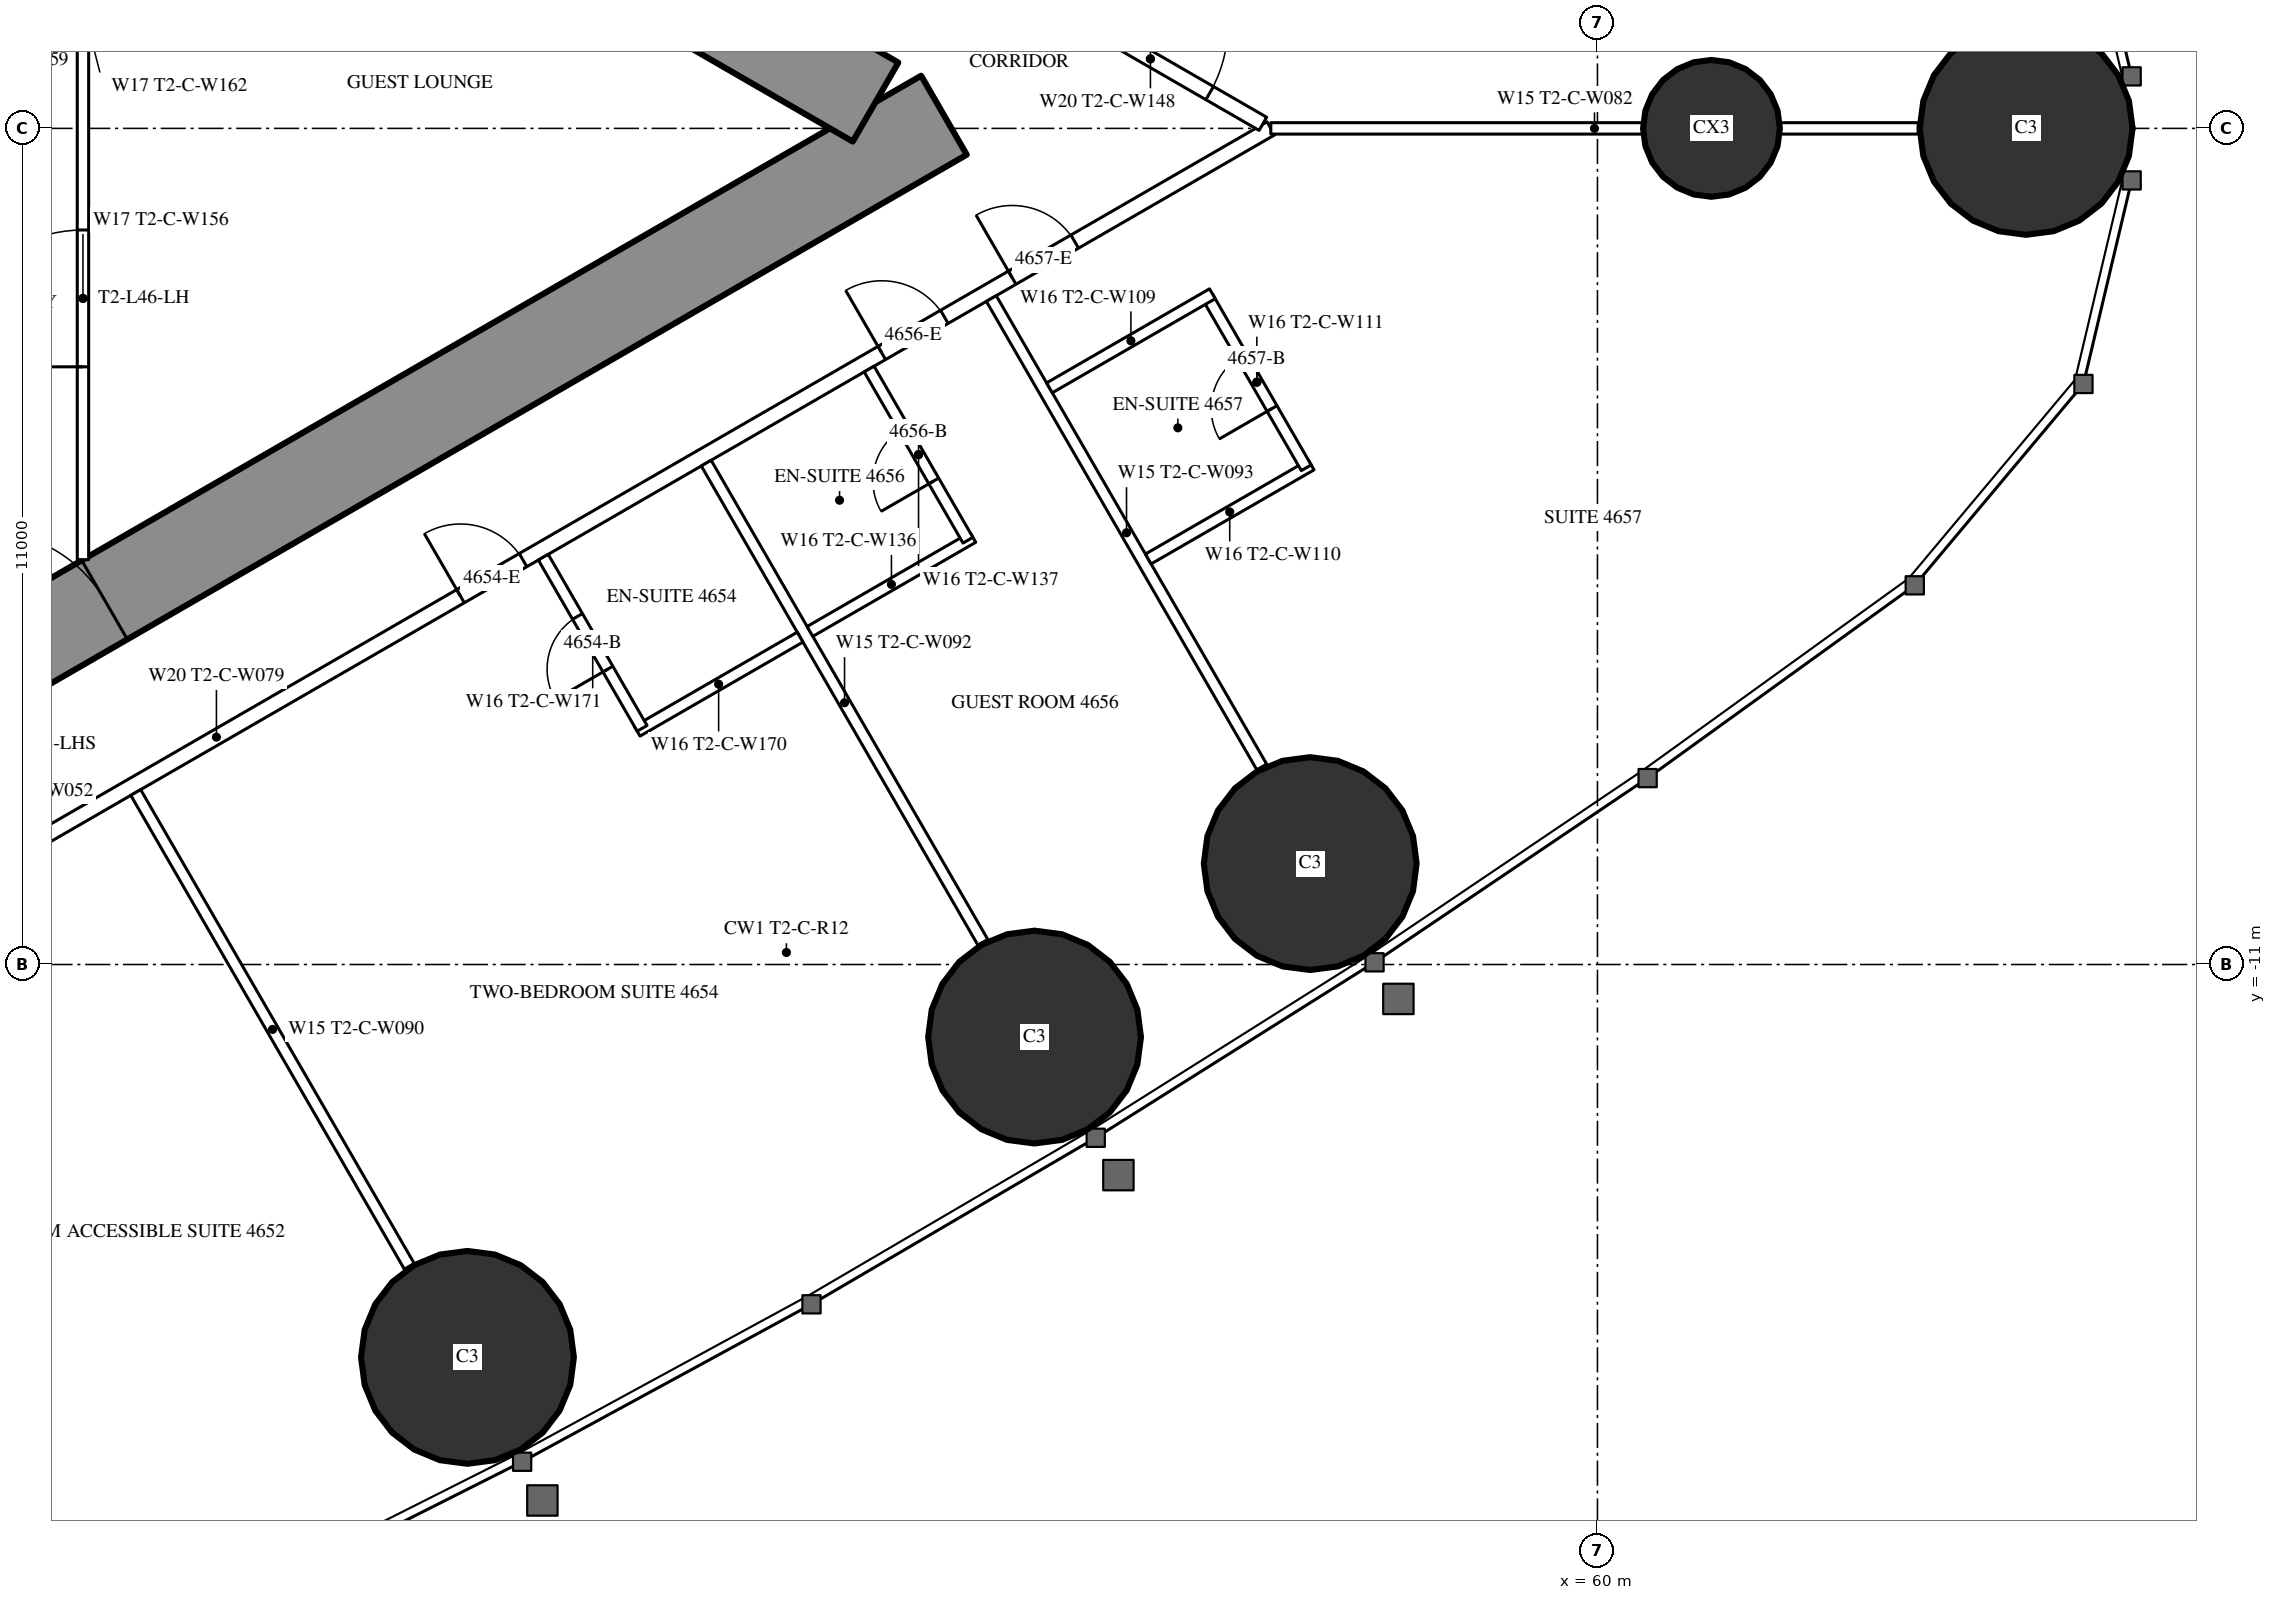
"""IFC4 building model, lengths in metres.
Left out: names, types, materials, properties, quantities, classifications, styles, units other than length and angle.
Written with IfcOpenShell. Run it as: python <this file> out.ifc"""

import sys

from ifc_helpers import new_model, si_unit, direction, frame, frame_2d, origin, origin_2d, place, context, subcontext, project, spatial, rectangle, circle, extrude, element, fill, save


model = new_model("IFC4")
c1 = context("Model", 3, precision=1e-05, world=origin(), true_north=direction((0.0, 1.0)))
c2 = subcontext(c1, "Body", "Model", "MODEL_VIEW")
j1 = project(units=[si_unit("LENGTHUNIT", "METRE"), si_unit("PLANEANGLEUNIT", "RADIAN")], contexts=[c1])
p1 = place(None, origin())
s1 = spatial("IfcSite", under=j1, at=p1, CompositionType="ELEMENT")
p2 = place(p1, origin())
s2 = spatial("IfcBuilding", under=s1, at=p2, CompositionType="ELEMENT")
p3 = place(p2, frame((0.0, 0.0, 173.8)))
s3 = spatial("IfcBuildingStorey", under=s2, at=p3, CompositionType="ELEMENT", Elevation=173.8)
for number, where, z_axis, x_axis in (
    (1, (65.64, 0.0, 0.0), (0.0, 0.0, 1.0), (1.0, 0.0, 0.0)),
    (2, (45.134, -16.168, 0.0), (0.0, 0.0, 1.0), (1.0, 0.0, 0.0)),
    (3, (52.594, -11.955, 0.0), (0.0, 0.0, 1.0), (1.0, 0.0, 0.0)),
    (4, (56.221, -9.672, 0.0), (0.0, 0.0, 1.0), (1.0, 0.0, 0.0)),
):
    element("IfcColumn", number, at=place(p3, frame(where, z_axis=z_axis, x_axis=x_axis)), inside=s3, PredefinedType="COLUMN", context=c2, shape_type="SweptSolid", body=[
        extrude(circle(Radius=1.4, at=origin_2d()), origin(), (0.0, 0.0, 1.0), 3.5),
    ])
p4 = place(p3, frame((61.5, 0.0, 0.0), z_axis=(0.0, 0.0, 1.0), x_axis=(1.0, 0.0, 0.0)))
e5 = element("IfcColumn", 5, at=p4, inside=s3, PredefinedType="COLUMN", context=c2, shape_type="SweptSolid", body=[
    extrude(circle(Radius=0.9, at=origin_2d()), origin(), (0.0, 0.0, 1.0), 3.5),
])
p5 = place(p3, frame((27.2, -13.8, 0.0), z_axis=(0.0, 0.0, 1.0), x_axis=(0.866027159892, 0.499996958321, 0.0)))
e6 = element("IfcWall", 6, at=p5, inside=s3, PredefinedType="SHEAR", context=c2, shape_type="SweptSolid", body=[
    extrude(rectangle(XDim=27.947, YDim=1.2, at=frame_2d((13.973, 0.0))), origin(), (0.0, 0.0, 1.0), 3.5),
])
p6 = place(p5, frame((4.6, 0.0, 0.0)))
e7 = element("IfcOpeningElement", 7, at=p6, cuts=e6, PredefinedType="OPENING", context=c2, shape_type="SweptSolid", body=[
    extrude(rectangle(XDim=1.0, YDim=2.2, at=frame_2d((0.5, 1.1))), frame((0.0, 0.61, 0.0), z_axis=(0.0, -1.0, 0.0), x_axis=(1.0, 0.0, 0.0)), (0.0, 0.0, 1.0), 1.22),
])
p7 = place(p5, frame((13.395, 0.0, 0.0)))
e8 = element("IfcOpeningElement", 8, at=p7, cuts=e6, PredefinedType="OPENING", context=c2, shape_type="SweptSolid", body=[
    extrude(rectangle(XDim=1.8, YDim=2.2, at=frame_2d((0.9, 1.1))), frame((0.0, 0.61, 0.0), z_axis=(0.0, -1.0, 0.0), x_axis=(1.0, 0.0, 0.0)), (0.0, 0.0, 1.0), 1.22),
])
p8 = place(p3, frame((27.2, 13.8, 0.0), z_axis=(0.0, 0.0, 1.0), x_axis=(0.866024515034, -0.500001539357, 0.0)))
e9 = element("IfcWall", 9, at=p8, inside=s3, PredefinedType="SHEAR", context=c2, shape_type="SweptSolid", body=[
    extrude(rectangle(XDim=26.907, YDim=1.2, at=frame_2d((13.454, 0.0))), origin(), (0.0, 0.0, 1.0), 3.5),
])
p9 = place(p8, frame((4.6, 0.0, 0.0)))
e10 = element("IfcOpeningElement", 10, at=p9, cuts=e9, PredefinedType="OPENING", context=c2, shape_type="SweptSolid", body=[
    extrude(rectangle(XDim=1.0, YDim=2.2, at=frame_2d((0.5, 1.1))), frame((0.0, 0.61, 0.0), z_axis=(0.0, -1.0, 0.0), x_axis=(1.0, 0.0, 0.0)), (0.0, 0.0, 1.0), 1.22),
])
p10 = place(p8, frame((13.395, 0.0, 0.0)))
e11 = element("IfcOpeningElement", 11, at=p10, cuts=e9, PredefinedType="OPENING", context=c2, shape_type="SweptSolid", body=[
    extrude(rectangle(XDim=1.8, YDim=2.2, at=frame_2d((0.9, 1.1))), frame((0.0, 0.61, 0.0), z_axis=(0.0, -1.0, 0.0), x_axis=(1.0, 0.0, 0.0)), (0.0, 0.0, 1.0), 1.22),
])
p11 = place(p3, frame((27.959, -16.017, 0.0), z_axis=(0.0, 0.0, 1.0), x_axis=(0.866024151371, 0.500002169237, 0.0)))
e12 = element("IfcWall", 12, at=p11, inside=s3, PredefinedType="PARTITIONING", context=c2, shape_type="SweptSolid", body=[
    extrude(rectangle(XDim=32.034, YDim=0.2, at=frame_2d((16.017, 0.0))), origin(), (0.0, 0.0, 1.0), 3.25),
])
p12 = place(p11, frame((4.765, 0.0, 0.0)))
e13 = element("IfcOpeningElement", 13, at=p12, cuts=e12, PredefinedType="OPENING", context=c2, shape_type="SweptSolid", body=[
    extrude(rectangle(XDim=0.95, YDim=2.2, at=frame_2d((0.475, 1.1))), frame((0.0, 0.11, 0.0), z_axis=(0.0, -1.0, 0.0), x_axis=(1.0, 0.0, 0.0)), (0.0, 0.0, 1.0), 0.22),
])
p13 = place(p11, frame((9.215, 0.0, 0.0)))
e14 = element("IfcOpeningElement", 14, at=p13, cuts=e12, PredefinedType="OPENING", context=c2, shape_type="SweptSolid", body=[
    extrude(rectangle(XDim=1.0, YDim=2.2, at=frame_2d((0.5, 1.1))), frame((0.0, 0.11, 0.0), z_axis=(0.0, -1.0, 0.0), x_axis=(1.0, 0.0, 0.0)), (0.0, 0.0, 1.0), 0.22),
])
p14 = place(p11, frame((19.725, 0.0, 0.0)))
e15 = element("IfcOpeningElement", 15, at=p14, cuts=e12, PredefinedType="OPENING", context=c2, shape_type="SweptSolid", body=[
    extrude(rectangle(XDim=0.95, YDim=2.2, at=frame_2d((0.475, 1.1))), frame((0.0, 0.11, 0.0), z_axis=(0.0, -1.0, 0.0), x_axis=(1.0, 0.0, 0.0)), (0.0, 0.0, 1.0), 0.22),
])
p15 = place(p11, frame((26.125, 0.0, 0.0)))
e16 = element("IfcOpeningElement", 16, at=p15, cuts=e12, PredefinedType="OPENING", context=c2, shape_type="SweptSolid", body=[
    extrude(rectangle(XDim=0.95, YDim=2.2, at=frame_2d((0.475, 1.1))), frame((0.0, 0.11, 0.0), z_axis=(0.0, -1.0, 0.0), x_axis=(1.0, 0.0, 0.0)), (0.0, 0.0, 1.0), 0.22),
])
p16 = place(p11, frame((28.106, 0.0, 0.0)))
e17 = element("IfcOpeningElement", 17, at=p16, cuts=e12, PredefinedType="OPENING", context=c2, shape_type="SweptSolid", body=[
    extrude(rectangle(XDim=0.95, YDim=2.2, at=frame_2d((0.475, 1.1))), frame((0.0, 0.11, 0.0), z_axis=(0.0, -1.0, 0.0), x_axis=(1.0, 0.0, 0.0)), (0.0, 0.0, 1.0), 0.22),
])
p17 = place(p3, frame((40.769, -8.737, 0.0), z_axis=(0.0, 0.0, 1.0), x_axis=(0.500013115284, -0.866017831539, 0.0)))
e18 = element("IfcWall", 18, at=p17, inside=s3, PredefinedType="PARTITIONING", context=c2, shape_type="SweptSolid", body=[
    extrude(rectangle(XDim=7.198, YDim=0.15, at=frame_2d((3.599, 0.0))), origin(), (0.0, 0.0, 1.0), 2.3),
])
p18 = place(p3, frame((48.275, -4.404, 0.0), z_axis=(0.0, 0.0, 1.0), x_axis=(0.500006004368, -0.866021937133, 0.0)))
e19 = element("IfcWall", 19, at=p18, inside=s3, PredefinedType="PARTITIONING", context=c2, shape_type="SweptSolid", body=[
    extrude(rectangle(XDim=7.279, YDim=0.15, at=frame_2d((3.64, 0.0))), origin(), (0.0, 0.0, 1.0), 2.3),
])
p19 = place(p3, frame((52.025, -2.238, 0.0), z_axis=(0.0, 0.0, 1.0), x_axis=(0.499983785035, -0.866034765296, 0.0)))
e20 = element("IfcWall", 20, at=p19, inside=s3, PredefinedType="PARTITIONING", context=c2, shape_type="SweptSolid", body=[
    extrude(rectangle(XDim=7.116, YDim=0.15, at=frame_2d((3.558, 0.0))), origin(), (0.0, 0.0, 1.0), 2.3),
])
p20 = place(p3, frame((55.702, 0.0, 0.0), z_axis=(0.0, 0.0, 1.0), x_axis=(1.0, 0.0, 0.0)))
e21 = element("IfcWall", 21, at=p20, inside=s3, PredefinedType="PARTITIONING", context=c2, shape_type="SweptSolid", body=[
    extrude(rectangle(XDim=8.518, YDim=0.15, at=frame_2d((4.259, 0.0))), origin(), (0.0, 0.0, 1.0), 2.3),
])
p21 = place(p3, frame((52.639, 1.769, 0.0), z_axis=(0.0, 0.0, 1.0), x_axis=(0.866027340901, -0.4999966448, 0.0)))
e22 = element("IfcWall", 22, at=p21, inside=s3, PredefinedType="PARTITIONING", context=c2, shape_type="SweptSolid", body=[
    extrude(rectangle(XDim=3.417, YDim=0.2, at=frame_2d((1.708, 0.0))), origin(), (0.0, 0.0, 1.0), 3.25),
])
p22 = place(p21, frame((0.809, 0.0, 0.0)))
e23 = element("IfcOpeningElement", 23, at=p22, cuts=e22, PredefinedType="OPENING", context=c2, shape_type="SweptSolid", body=[
    extrude(rectangle(XDim=1.8, YDim=2.2, at=frame_2d((0.9, 1.1))), frame((0.0, 0.11, 0.0), z_axis=(0.0, -1.0, 0.0), x_axis=(1.0, 0.0, 0.0)), (0.0, 0.0, 1.0), 0.22),
])
p23 = place(p3, frame((47.366, -7.93, 0.0), z_axis=(0.0, 0.0, 1.0), x_axis=(0.866031185235, 0.4999899861, 0.0)))
e24 = element("IfcWall", 24, at=p23, inside=s3, PredefinedType="PARTITIONING", context=c2, shape_type="SweptSolid", body=[
    extrude(rectangle(XDim=2.475, YDim=0.15, at=frame_2d((1.238, 0.0))), origin(), (0.0, 0.0, 1.0), 3.25),
])
p24 = place(p3, frame((46.131, -5.641, 0.0), z_axis=(0.0, 0.0, 1.0), x_axis=(0.49997716683, -0.86603858612, 0.0)))
e25 = element("IfcWall", 25, at=p24, inside=s3, PredefinedType="PARTITIONING", context=c2, shape_type="SweptSolid", body=[
    extrude(rectangle(XDim=2.6, YDim=0.15, at=frame_2d((1.3, 0.0))), origin(), (0.0, 0.0, 1.0), 3.25),
])
p25 = place(p24, frame((0.9, 0.0, 0.0)))
e26 = element("IfcOpeningElement", 26, at=p25, cuts=e25, PredefinedType="OPENING", context=c2, shape_type="SweptSolid", body=[
    extrude(rectangle(XDim=0.8, YDim=2.2, at=frame_2d((0.4, 1.1))), frame((0.0, 0.085, 0.0), z_axis=(0.0, -1.0, 0.0), x_axis=(1.0, 0.0, 0.0)), (0.0, 0.0, 1.0), 0.17),
])
p26 = place(p3, frame((49.64, -6.618, 0.0), z_axis=(0.0, 0.0, 1.0), x_axis=(0.866006523861, 0.500032699561, 0.0)))
e27 = element("IfcWall", 27, at=p26, inside=s3, PredefinedType="PARTITIONING", context=c2, shape_type="SweptSolid", body=[
    extrude(rectangle(XDim=2.475, YDim=0.15, at=frame_2d((1.237, 0.0))), origin(), (0.0, 0.0, 1.0), 3.25),
])
p27 = place(p3, frame((50.418, -3.166, 0.0), z_axis=(0.0, 0.0, 1.0), x_axis=(0.499936506574, -0.866062058628, 0.0)))
e28 = element("IfcWall", 28, at=p27, inside=s3, PredefinedType="PARTITIONING", context=c2, shape_type="SweptSolid", body=[
    extrude(rectangle(XDim=2.6, YDim=0.15, at=frame_2d((1.3, 0.0))), origin(), (0.0, 0.0, 1.0), 3.25),
])
p28 = place(p27, frame((0.9, 0.0, 0.0)))
e29 = element("IfcOpeningElement", 29, at=p28, cuts=e28, PredefinedType="OPENING", context=c2, shape_type="SweptSolid", body=[
    extrude(rectangle(XDim=0.8, YDim=2.2, at=frame_2d((0.4, 1.1))), frame((0.0, 0.085, 0.0), z_axis=(0.0, -1.0, 0.0), x_axis=(1.0, 0.0, 0.0)), (0.0, 0.0, 1.0), 0.17),
])
p29 = place(p3, frame((54.09, -5.665, 0.0), z_axis=(0.0, 0.0, 1.0), x_axis=(0.866006523861, 0.500032699561, 0.0)))
e30 = element("IfcWall", 30, at=p29, inside=s3, PredefinedType="PARTITIONING", context=c2, shape_type="SweptSolid", body=[
    extrude(rectangle(XDim=2.475, YDim=0.15, at=frame_2d((1.237, 0.0))), origin(), (0.0, 0.0, 1.0), 3.25),
])
p30 = place(p3, frame((54.869, -2.213, 0.0), z_axis=(0.0, 0.0, 1.0), x_axis=(0.500047596559, -0.865997922154, 0.0)))
e31 = element("IfcWall", 31, at=p30, inside=s3, PredefinedType="PARTITIONING", context=c2, shape_type="SweptSolid", body=[
    extrude(rectangle(XDim=2.6, YDim=0.15, at=frame_2d((1.3, 0.0))), origin(), (0.0, 0.0, 1.0), 3.25),
])
p31 = place(p30, frame((0.9, 0.0, 0.0)))
e32 = element("IfcOpeningElement", 32, at=p31, cuts=e31, PredefinedType="OPENING", context=c2, shape_type="SweptSolid", body=[
    extrude(rectangle(XDim=0.8, YDim=2.2, at=frame_2d((0.4, 1.1))), frame((0.0, 0.085, 0.0), z_axis=(0.0, -1.0, 0.0), x_axis=(1.0, 0.0, 0.0)), (0.0, 0.0, 1.0), 0.17),
])
p32 = place(p3, frame((52.79, -3.413, 0.0), z_axis=(0.0, 0.0, 1.0), x_axis=(0.866006523861, 0.500032699561, 0.0)))
e33 = element("IfcWall", 33, at=p32, inside=s3, PredefinedType="PARTITIONING", context=c2, shape_type="SweptSolid", body=[
    extrude(rectangle(XDim=2.475, YDim=0.15, at=frame_2d((1.237, 0.0))), origin(), (0.0, 0.0, 1.0), 3.25),
])
p33 = place(p3, frame((40.075, -5.674, 0.0), z_axis=(0.0, 0.0, 1.0), x_axis=(0.0, 1.0, 0.0)))
e34 = element("IfcWall", 34, at=p33, inside=s3, PredefinedType="PARTITIONING", context=c2, shape_type="SweptSolid", body=[
    extrude(rectangle(XDim=6.874, YDim=0.15, at=frame_2d((3.437, 0.0))), origin(), (0.0, 0.0, 1.0), 3.25),
])
p34 = place(p33, frame((2.537, 0.0, 0.0)))
e35 = element("IfcOpeningElement", 35, at=p34, cuts=e34, PredefinedType="OPENING", context=c2, shape_type="SweptSolid", body=[
    extrude(rectangle(XDim=1.8, YDim=2.2, at=frame_2d((0.9, 1.1))), frame((0.0, 0.085, 0.0), z_axis=(0.0, -1.0, 0.0), x_axis=(1.0, 0.0, 0.0)), (0.0, 0.0, 1.0), 0.17),
])
p35 = place(p25, origin())
e36 = element("IfcDoor", 36, at=p35, inside=s3, OperationType="SINGLE_SWING_RIGHT", PredefinedType="DOOR", context=c2, shape_type="SweptSolid", body=[
    extrude(rectangle(XDim=0.8, YDim=2.2, at=frame_2d((0.4, 1.1))), frame((0.0, 0.025, 0.0), z_axis=(0.0, -1.0, 0.0), x_axis=(1.0, 0.0, 0.0)), (0.0, 0.0, 1.0), 0.05),
])
fill(e26, e36)
p36 = place(p14, origin())
e37 = element("IfcDoor", 37, at=p36, inside=s3, OperationType="SINGLE_SWING_LEFT", PredefinedType="DOOR", context=c2, shape_type="SweptSolid", body=[
    extrude(rectangle(XDim=0.95, YDim=2.2, at=frame_2d((0.475, 1.1))), frame((0.0, 0.025, 0.0), z_axis=(0.0, -1.0, 0.0), x_axis=(1.0, 0.0, 0.0)), (0.0, 0.0, 1.0), 0.05),
])
fill(e15, e37)
p37 = place(p28, origin())
e38 = element("IfcDoor", 38, at=p37, inside=s3, OperationType="SINGLE_SWING_RIGHT", PredefinedType="DOOR", context=c2, shape_type="SweptSolid", body=[
    extrude(rectangle(XDim=0.8, YDim=2.2, at=frame_2d((0.4, 1.1))), frame((0.0, 0.025, 0.0), z_axis=(0.0, -1.0, 0.0), x_axis=(1.0, 0.0, 0.0)), (0.0, 0.0, 1.0), 0.05),
])
fill(e29, e38)
p38 = place(p15, origin())
e39 = element("IfcDoor", 39, at=p38, inside=s3, OperationType="SINGLE_SWING_LEFT", PredefinedType="DOOR", context=c2, shape_type="SweptSolid", body=[
    extrude(rectangle(XDim=0.95, YDim=2.2, at=frame_2d((0.475, 1.1))), frame((0.0, 0.025, 0.0), z_axis=(0.0, -1.0, 0.0), x_axis=(1.0, 0.0, 0.0)), (0.0, 0.0, 1.0), 0.05),
])
fill(e16, e39)
p39 = place(p31, origin())
e40 = element("IfcDoor", 40, at=p39, inside=s3, OperationType="SINGLE_SWING_RIGHT", PredefinedType="DOOR", context=c2, shape_type="SweptSolid", body=[
    extrude(rectangle(XDim=0.8, YDim=2.2, at=frame_2d((0.4, 1.1))), frame((0.0, 0.025, 0.0), z_axis=(0.0, -1.0, 0.0), x_axis=(1.0, 0.0, 0.0)), (0.0, 0.0, 1.0), 0.05),
])
fill(e32, e40)
p40 = place(p16, origin())
e41 = element("IfcDoor", 41, at=p40, inside=s3, OperationType="SINGLE_SWING_LEFT", PredefinedType="DOOR", context=c2, shape_type="SweptSolid", body=[
    extrude(rectangle(XDim=0.95, YDim=2.2, at=frame_2d((0.475, 1.1))), frame((0.0, 0.025, 0.0), z_axis=(0.0, -1.0, 0.0), x_axis=(1.0, 0.0, 0.0)), (0.0, 0.0, 1.0), 0.05),
])
fill(e17, e41)
p41 = place(p22, origin())
e42 = element("IfcDoor", 42, at=p41, inside=s3, OperationType="DOUBLE_DOOR_SINGLE_SWING", PredefinedType="DOOR", context=c2, shape_type="SweptSolid", body=[
    extrude(rectangle(XDim=1.8, YDim=2.2, at=frame_2d((0.9, 1.1))), frame((0.0, 0.025, 0.0), z_axis=(0.0, -1.0, 0.0), x_axis=(1.0, 0.0, 0.0)), (0.0, 0.0, 1.0), 0.05),
])
fill(e23, e42)
p42 = place(p34, origin())
e43 = element("IfcDoor", 43, at=p42, inside=s3, OperationType="DOUBLE_DOOR_SINGLE_SWING", PredefinedType="DOOR", context=c2, shape_type="SweptSolid", body=[
    extrude(rectangle(XDim=1.8, YDim=2.2, at=frame_2d((0.9, 1.1))), frame((0.0, 0.025, 0.0), z_axis=(0.0, -1.0, 0.0), x_axis=(1.0, 0.0, 0.0)), (0.0, 0.0, 1.0), 0.05),
])
fill(e35, e43)
p43 = place(p7, origin())
e44 = element("IfcDoor", 44, at=p43, inside=s3, OperationType="DOUBLE_DOOR_SINGLE_SWING", PredefinedType="DOOR", context=c2, shape_type="SweptSolid", body=[
    extrude(rectangle(XDim=1.8, YDim=2.2, at=frame_2d((0.9, 1.1))), frame((0.0, 0.025, 0.0), z_axis=(0.0, -1.0, 0.0), x_axis=(1.0, 0.0, 0.0)), (0.0, 0.0, 1.0), 0.05),
])
fill(e8, e44)
save(model, sys.argv[1])
